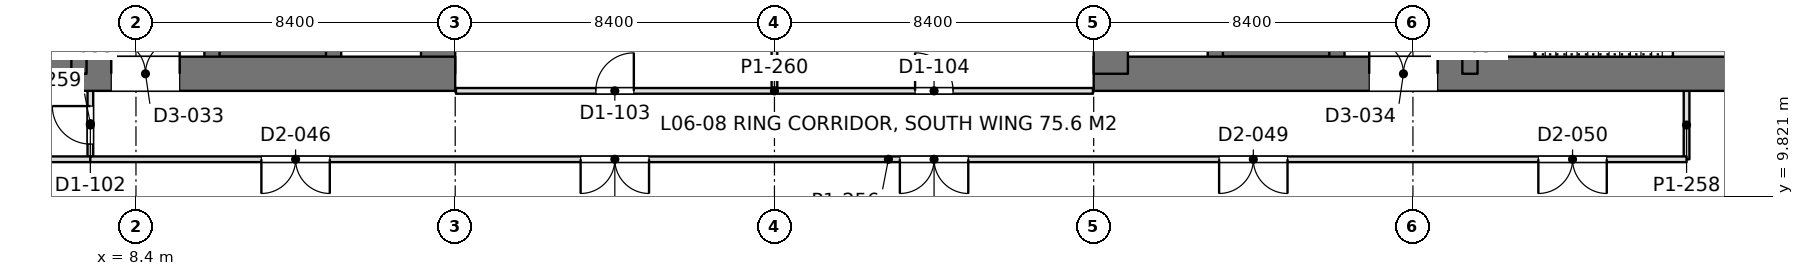
"""IFC4 building model, lengths in metres.
Left out: names, types, materials, properties, quantities, classifications, styles, units other than length and angle.
Written with IfcOpenShell. Run it as: python <this file> out.ifc"""

import sys

from ifc_helpers import new_model, si_unit, direction, frame, frame_2d, origin, place, context, subcontext, project, spatial, rectangle, extrude, element, fill, save


model = new_model("IFC4")
c1 = context("Model", 3, precision=1e-05, world=origin(), true_north=direction((0.0, 1.0)))
c2 = subcontext(c1, "Body", "Model", "MODEL_VIEW")
j1 = project(units=[si_unit("LENGTHUNIT", "METRE"), si_unit("PLANEANGLEUNIT", "RADIAN")], contexts=[c1])
p1 = place(None, origin())
s1 = spatial("IfcSite", under=j1, at=p1, CompositionType="ELEMENT")
p2 = place(p1, origin())
s2 = spatial("IfcBuilding", under=s1, at=p2, CompositionType="ELEMENT")
p3 = place(p2, frame((0.0, 0.0, 27.9)))
s3 = spatial("IfcBuildingStorey", under=s2, at=p3, CompositionType="ELEMENT", Elevation=27.9)
p4 = place(p3, frame((-1.2, 13.05, 0.0), z_axis=(0.0, 0.0, 1.0), x_axis=(1.0, 0.0, 0.0)))
e1 = element("IfcWall", 1, at=p4, inside=s3, PredefinedType="SHEAR", context=c2, shape_type="SweptSolid", body=[
    extrude(rectangle(XDim=18.0, YDim=0.9, at=frame_2d((9.0, 0.0))), origin(), (0.0, 0.0, 1.0), 4.5),
])
p5 = place(p4, frame((8.95, 0.0, 0.0)))
e2 = element("IfcOpeningElement", 2, at=p5, cuts=e1, PredefinedType="OPENING", context=c2, shape_type="SweptSolid", body=[
    extrude(rectangle(XDim=1.8, YDim=2.4, at=frame_2d((0.9, 1.2))), frame((0.0, 0.46, 0.0), z_axis=(0.0, -1.0, 0.0), x_axis=(1.0, 0.0, 0.0)), (0.0, 0.0, 1.0), 0.92),
])
p6 = place(p3, frame((16.35, 13.05, 0.0), z_axis=(0.0, 0.0, 1.0), x_axis=(0.0, 1.0, 0.0)))
e3 = element("IfcWall", 3, at=p6, inside=s3, PredefinedType="SHEAR", context=c2, shape_type="SweptSolid", body=[
    extrude(rectangle(XDim=24.3, YDim=0.9, at=frame_2d((12.15, 0.0))), origin(), (0.0, 0.0, 1.0), 4.5),
])
p7 = place(p3, frame((6.9, 13.05, 0.0), z_axis=(0.0, 0.0, 1.0), x_axis=(0.0, 1.0, 0.0)))
e4 = element("IfcWall", 4, at=p7, inside=s3, PredefinedType="SHEAR", context=c2, shape_type="SweptSolid", body=[
    extrude(rectangle(XDim=24.3, YDim=0.4, at=frame_2d((12.15, 0.0))), origin(), (0.0, 0.0, 1.0), 4.5),
])
p8 = place(p7, frame((1.3, 0.0, 0.0)))
e5 = element("IfcOpeningElement", 5, at=p8, cuts=e4, PredefinedType="OPENING", context=c2, shape_type="SweptSolid", body=[
    extrude(rectangle(XDim=1.0, YDim=2.2, at=frame_2d((0.5, 1.1))), frame((0.0, 0.21, 0.0), z_axis=(0.0, -1.0, 0.0), x_axis=(1.0, 0.0, 0.0)), (0.0, 0.0, 1.0), 0.42),
])
p9 = place(p7, frame((22.0, 0.0, 0.0)))
e6 = element("IfcOpeningElement", 6, at=p9, cuts=e4, PredefinedType="OPENING", context=c2, shape_type="SweptSolid", body=[
    extrude(rectangle(XDim=1.0, YDim=2.2, at=frame_2d((0.5, 1.1))), frame((0.0, 0.21, 0.0), z_axis=(0.0, -1.0, 0.0), x_axis=(1.0, 0.0, 0.0)), (0.0, 0.0, 1.0), 0.42),
])
p10 = place(p7, frame((5.55, 0.0, 0.0)))
e7 = element("IfcOpeningElement", 7, at=p10, cuts=e4, PredefinedType="OPENING", context=c2, shape_type="SweptSolid", body=[
    extrude(rectangle(XDim=1.0, YDim=2.2, at=frame_2d((0.5, 1.1))), frame((0.0, 0.21, 0.0), z_axis=(0.0, -1.0, 0.0), x_axis=(1.0, 0.0, 0.0)), (0.0, 0.0, 1.0), 0.42),
])
p11 = place(p7, frame((9.55, 0.0, 0.0)))
e8 = element("IfcOpeningElement", 8, at=p11, cuts=e4, PredefinedType="OPENING", context=c2, shape_type="SweptSolid", body=[
    extrude(rectangle(XDim=1.0, YDim=2.2, at=frame_2d((0.5, 1.1))), frame((0.0, 0.21, 0.0), z_axis=(0.0, -1.0, 0.0), x_axis=(1.0, 0.0, 0.0)), (0.0, 0.0, 1.0), 0.42),
])
p12 = place(p7, frame((12.8, 0.0, 0.0)))
e9 = element("IfcOpeningElement", 9, at=p12, cuts=e4, PredefinedType="OPENING", context=c2, shape_type="SweptSolid", body=[
    extrude(rectangle(XDim=1.1, YDim=2.2, at=frame_2d((0.55, 1.1))), frame((0.0, 0.21, 0.0), z_axis=(0.0, -1.0, 0.0), x_axis=(1.0, 0.0, 0.0)), (0.0, 0.0, 1.0), 0.42),
])
p13 = place(p7, frame((15.538, 0.0, 0.0)))
e10 = element("IfcOpeningElement", 10, at=p13, cuts=e4, PredefinedType="OPENING", context=c2, shape_type="SweptSolid", body=[
    extrude(rectangle(XDim=1.1, YDim=2.2, at=frame_2d((0.55, 1.1))), frame((0.0, 0.21, 0.0), z_axis=(0.0, -1.0, 0.0), x_axis=(1.0, 0.0, 0.0)), (0.0, 0.0, 1.0), 0.42),
])
p14 = place(p7, frame((18.262, 0.0, 0.0)))
e11 = element("IfcOpeningElement", 11, at=p14, cuts=e4, PredefinedType="OPENING", context=c2, shape_type="SweptSolid", body=[
    extrude(rectangle(XDim=1.1, YDim=2.2, at=frame_2d((0.55, 1.1))), frame((0.0, 0.21, 0.0), z_axis=(0.0, -1.0, 0.0), x_axis=(1.0, 0.0, 0.0)), (0.0, 0.0, 1.0), 0.42),
])
p15 = place(p3, frame((10.4, 13.05, 0.0), z_axis=(0.0, 0.0, 1.0), x_axis=(0.0, 1.0, 0.0)))
e12 = element("IfcWall", 12, at=p15, inside=s3, PredefinedType="SHEAR", context=c2, shape_type="SweptSolid", body=[
    extrude(rectangle(XDim=24.3, YDim=0.4, at=frame_2d((12.15, 0.0))), origin(), (0.0, 0.0, 1.0), 4.5),
])
p16 = place(p15, frame((1.5, 0.0, 0.0)))
e13 = element("IfcOpeningElement", 13, at=p16, cuts=e12, PredefinedType="OPENING", context=c2, shape_type="SweptSolid", body=[
    extrude(rectangle(XDim=1.1, YDim=2.2, at=frame_2d((0.55, 1.1))), frame((0.0, 0.21, 0.0), z_axis=(0.0, -1.0, 0.0), x_axis=(1.0, 0.0, 0.0)), (0.0, 0.0, 1.0), 0.42),
])
p17 = place(p15, frame((4.35, 0.0, 0.0)))
e14 = element("IfcOpeningElement", 14, at=p17, cuts=e12, PredefinedType="OPENING", context=c2, shape_type="SweptSolid", body=[
    extrude(rectangle(XDim=1.1, YDim=2.2, at=frame_2d((0.55, 1.1))), frame((0.0, 0.21, 0.0), z_axis=(0.0, -1.0, 0.0), x_axis=(1.0, 0.0, 0.0)), (0.0, 0.0, 1.0), 0.42),
])
p18 = place(p15, frame((7.2, 0.0, 0.0)))
e15 = element("IfcOpeningElement", 15, at=p18, cuts=e12, PredefinedType="OPENING", context=c2, shape_type="SweptSolid", body=[
    extrude(rectangle(XDim=1.1, YDim=2.2, at=frame_2d((0.55, 1.1))), frame((0.0, 0.21, 0.0), z_axis=(0.0, -1.0, 0.0), x_axis=(1.0, 0.0, 0.0)), (0.0, 0.0, 1.0), 0.42),
])
p19 = place(p15, frame((21.45, 0.0, 0.0)))
e16 = element("IfcOpeningElement", 16, at=p19, cuts=e12, PredefinedType="OPENING", context=c2, shape_type="SweptSolid", body=[
    extrude(rectangle(XDim=1.1, YDim=2.2, at=frame_2d((0.55, 1.1))), frame((0.0, 0.21, 0.0), z_axis=(0.0, -1.0, 0.0), x_axis=(1.0, 0.0, 0.0)), (0.0, 0.0, 1.0), 0.42),
])
p20 = place(p3, frame((13.6, 13.05, 0.0), z_axis=(0.0, 0.0, 1.0), x_axis=(0.0, 1.0, 0.0)))
e17 = element("IfcWall", 17, at=p20, inside=s3, PredefinedType="SHEAR", context=c2, shape_type="SweptSolid", body=[
    extrude(rectangle(XDim=24.3, YDim=0.4, at=frame_2d((12.15, 0.0))), origin(), (0.0, 0.0, 1.0), 4.5),
])
p21 = place(p3, frame((10.4, 13.65, 0.0), z_axis=(0.0, 0.0, 1.0), x_axis=(1.0, 0.0, 0.0)))
e18 = element("IfcWall", 18, at=p21, inside=s3, PredefinedType="SHEAR", context=c2, shape_type="SweptSolid", body=[
    extrude(rectangle(XDim=3.2, YDim=0.3, at=frame_2d((1.6, 0.0))), origin(), (0.0, 0.0, 1.0), 4.5),
])
p22 = place(p3, frame((33.6, 13.05, 0.0), z_axis=(0.0, 0.0, 1.0), x_axis=(1.0, 0.0, 0.0)))
e19 = element("IfcWall", 19, at=p22, inside=s3, PredefinedType="SHEAR", context=c2, shape_type="SweptSolid", body=[
    extrude(rectangle(XDim=18.0, YDim=0.9, at=frame_2d((9.0, 0.0))), origin(), (0.0, 0.0, 1.0), 4.5),
])
p23 = place(p22, frame((7.25, 0.0, 0.0)))
e20 = element("IfcOpeningElement", 20, at=p23, cuts=e19, PredefinedType="OPENING", context=c2, shape_type="SweptSolid", body=[
    extrude(rectangle(XDim=1.8, YDim=2.4, at=frame_2d((0.9, 1.2))), frame((0.0, 0.46, 0.0), z_axis=(0.0, -1.0, 0.0), x_axis=(1.0, 0.0, 0.0)), (0.0, 0.0, 1.0), 0.92),
])
p24 = place(p3, frame((34.05, 13.05, 0.0), z_axis=(0.0, 0.0, 1.0), x_axis=(0.0, 1.0, 0.0)))
e21 = element("IfcWall", 21, at=p24, inside=s3, PredefinedType="SHEAR", context=c2, shape_type="SweptSolid", body=[
    extrude(rectangle(XDim=24.3, YDim=0.9, at=frame_2d((12.15, 0.0))), origin(), (0.0, 0.0, 1.0), 4.5),
])
p25 = place(p3, frame((43.5, 13.05, 0.0), z_axis=(0.0, 0.0, 1.0), x_axis=(0.0, 1.0, 0.0)))
e22 = element("IfcWall", 22, at=p25, inside=s3, PredefinedType="SHEAR", context=c2, shape_type="SweptSolid", body=[
    extrude(rectangle(XDim=24.3, YDim=0.4, at=frame_2d((12.15, 0.0))), origin(), (0.0, 0.0, 1.0), 4.5),
])
p26 = place(p25, frame((1.3, 0.0, 0.0)))
e23 = element("IfcOpeningElement", 23, at=p26, cuts=e22, PredefinedType="OPENING", context=c2, shape_type="SweptSolid", body=[
    extrude(rectangle(XDim=1.0, YDim=2.2, at=frame_2d((0.5, 1.1))), frame((0.0, 0.21, 0.0), z_axis=(0.0, -1.0, 0.0), x_axis=(1.0, 0.0, 0.0)), (0.0, 0.0, 1.0), 0.42),
])
p27 = place(p25, frame((22.0, 0.0, 0.0)))
e24 = element("IfcOpeningElement", 24, at=p27, cuts=e22, PredefinedType="OPENING", context=c2, shape_type="SweptSolid", body=[
    extrude(rectangle(XDim=1.0, YDim=2.2, at=frame_2d((0.5, 1.1))), frame((0.0, 0.21, 0.0), z_axis=(0.0, -1.0, 0.0), x_axis=(1.0, 0.0, 0.0)), (0.0, 0.0, 1.0), 0.42),
])
p28 = place(p25, frame((5.55, 0.0, 0.0)))
e25 = element("IfcOpeningElement", 25, at=p28, cuts=e22, PredefinedType="OPENING", context=c2, shape_type="SweptSolid", body=[
    extrude(rectangle(XDim=1.0, YDim=2.2, at=frame_2d((0.5, 1.1))), frame((0.0, 0.21, 0.0), z_axis=(0.0, -1.0, 0.0), x_axis=(1.0, 0.0, 0.0)), (0.0, 0.0, 1.0), 0.42),
])
p29 = place(p25, frame((9.55, 0.0, 0.0)))
e26 = element("IfcOpeningElement", 26, at=p29, cuts=e22, PredefinedType="OPENING", context=c2, shape_type="SweptSolid", body=[
    extrude(rectangle(XDim=1.0, YDim=2.2, at=frame_2d((0.5, 1.1))), frame((0.0, 0.21, 0.0), z_axis=(0.0, -1.0, 0.0), x_axis=(1.0, 0.0, 0.0)), (0.0, 0.0, 1.0), 0.42),
])
p30 = place(p25, frame((12.8, 0.0, 0.0)))
e27 = element("IfcOpeningElement", 27, at=p30, cuts=e22, PredefinedType="OPENING", context=c2, shape_type="SweptSolid", body=[
    extrude(rectangle(XDim=1.1, YDim=2.2, at=frame_2d((0.55, 1.1))), frame((0.0, 0.21, 0.0), z_axis=(0.0, -1.0, 0.0), x_axis=(1.0, 0.0, 0.0)), (0.0, 0.0, 1.0), 0.42),
])
p31 = place(p25, frame((15.538, 0.0, 0.0)))
e28 = element("IfcOpeningElement", 28, at=p31, cuts=e22, PredefinedType="OPENING", context=c2, shape_type="SweptSolid", body=[
    extrude(rectangle(XDim=1.1, YDim=2.2, at=frame_2d((0.55, 1.1))), frame((0.0, 0.21, 0.0), z_axis=(0.0, -1.0, 0.0), x_axis=(1.0, 0.0, 0.0)), (0.0, 0.0, 1.0), 0.42),
])
p32 = place(p25, frame((18.262, 0.0, 0.0)))
e29 = element("IfcOpeningElement", 29, at=p32, cuts=e22, PredefinedType="OPENING", context=c2, shape_type="SweptSolid", body=[
    extrude(rectangle(XDim=1.1, YDim=2.2, at=frame_2d((0.55, 1.1))), frame((0.0, 0.21, 0.0), z_axis=(0.0, -1.0, 0.0), x_axis=(1.0, 0.0, 0.0)), (0.0, 0.0, 1.0), 0.42),
])
p33 = place(p3, frame((40.0, 13.05, 0.0), z_axis=(0.0, 0.0, 1.0), x_axis=(0.0, 1.0, 0.0)))
e30 = element("IfcWall", 30, at=p33, inside=s3, PredefinedType="SHEAR", context=c2, shape_type="SweptSolid", body=[
    extrude(rectangle(XDim=24.3, YDim=0.4, at=frame_2d((12.15, 0.0))), origin(), (0.0, 0.0, 1.0), 4.5),
])
p34 = place(p33, frame((1.5, 0.0, 0.0)))
e31 = element("IfcOpeningElement", 31, at=p34, cuts=e30, PredefinedType="OPENING", context=c2, shape_type="SweptSolid", body=[
    extrude(rectangle(XDim=1.1, YDim=2.2, at=frame_2d((0.55, 1.1))), frame((0.0, 0.21, 0.0), z_axis=(0.0, -1.0, 0.0), x_axis=(1.0, 0.0, 0.0)), (0.0, 0.0, 1.0), 0.42),
])
p35 = place(p33, frame((4.35, 0.0, 0.0)))
e32 = element("IfcOpeningElement", 32, at=p35, cuts=e30, PredefinedType="OPENING", context=c2, shape_type="SweptSolid", body=[
    extrude(rectangle(XDim=1.1, YDim=2.2, at=frame_2d((0.55, 1.1))), frame((0.0, 0.21, 0.0), z_axis=(0.0, -1.0, 0.0), x_axis=(1.0, 0.0, 0.0)), (0.0, 0.0, 1.0), 0.42),
])
p36 = place(p33, frame((7.2, 0.0, 0.0)))
e33 = element("IfcOpeningElement", 33, at=p36, cuts=e30, PredefinedType="OPENING", context=c2, shape_type="SweptSolid", body=[
    extrude(rectangle(XDim=1.1, YDim=2.2, at=frame_2d((0.55, 1.1))), frame((0.0, 0.21, 0.0), z_axis=(0.0, -1.0, 0.0), x_axis=(1.0, 0.0, 0.0)), (0.0, 0.0, 1.0), 0.42),
])
p37 = place(p33, frame((21.45, 0.0, 0.0)))
e34 = element("IfcOpeningElement", 34, at=p37, cuts=e30, PredefinedType="OPENING", context=c2, shape_type="SweptSolid", body=[
    extrude(rectangle(XDim=1.1, YDim=2.2, at=frame_2d((0.55, 1.1))), frame((0.0, 0.21, 0.0), z_axis=(0.0, -1.0, 0.0), x_axis=(1.0, 0.0, 0.0)), (0.0, 0.0, 1.0), 0.42),
])
p38 = place(p3, frame((36.8, 13.05, 0.0), z_axis=(0.0, 0.0, 1.0), x_axis=(0.0, 1.0, 0.0)))
e35 = element("IfcWall", 35, at=p38, inside=s3, PredefinedType="SHEAR", context=c2, shape_type="SweptSolid", body=[
    extrude(rectangle(XDim=24.3, YDim=0.4, at=frame_2d((12.15, 0.0))), origin(), (0.0, 0.0, 1.0), 4.5),
])
p39 = place(p3, frame((40.0, 13.65, 0.0), z_axis=(0.0, 0.0, 1.0), x_axis=(-1.0, 0.0, 0.0)))
e36 = element("IfcWall", 36, at=p39, inside=s3, PredefinedType="SHEAR", context=c2, shape_type="SweptSolid", body=[
    extrude(rectangle(XDim=3.2, YDim=0.3, at=frame_2d((1.6, 0.0))), origin(), (0.0, 0.0, 1.0), 4.5),
])
p40 = place(p3, frame((7.198, 10.8, 0.0), z_axis=(0.0, 0.0, 1.0), x_axis=(1.0, 0.0, 0.0)))
e37 = element("IfcWall", 37, at=p40, inside=s3, PredefinedType="PARTITIONING", context=c2, shape_type="SweptSolid", body=[
    extrude(rectangle(XDim=42.002, YDim=0.15, at=frame_2d((21.001, 0.0))), origin(), (0.0, 0.0, 1.0), 3.74),
])
p41 = place(p40, frame((4.502, 0.0, 0.0)))
e38 = element("IfcOpeningElement", 38, at=p41, cuts=e37, PredefinedType="OPENING", context=c2, shape_type="SweptSolid", body=[
    extrude(rectangle(XDim=1.8, YDim=2.2, at=frame_2d((0.9, 1.1))), frame((0.0, 0.085, 0.0), z_axis=(0.0, -1.0, 0.0), x_axis=(1.0, 0.0, 0.0)), (0.0, 0.0, 1.0), 0.17),
])
p42 = place(p40, frame((12.902, 0.0, 0.0)))
e39 = element("IfcOpeningElement", 39, at=p42, cuts=e37, PredefinedType="OPENING", context=c2, shape_type="SweptSolid", body=[
    extrude(rectangle(XDim=1.8, YDim=2.2, at=frame_2d((0.9, 1.1))), frame((0.0, 0.085, 0.0), z_axis=(0.0, -1.0, 0.0), x_axis=(1.0, 0.0, 0.0)), (0.0, 0.0, 1.0), 0.17),
])
p43 = place(p40, frame((21.302, 0.0, 0.0)))
e40 = element("IfcOpeningElement", 40, at=p43, cuts=e37, PredefinedType="OPENING", context=c2, shape_type="SweptSolid", body=[
    extrude(rectangle(XDim=1.8, YDim=2.2, at=frame_2d((0.9, 1.1))), frame((0.0, 0.085, 0.0), z_axis=(0.0, -1.0, 0.0), x_axis=(1.0, 0.0, 0.0)), (0.0, 0.0, 1.0), 0.17),
])
p44 = place(p40, frame((29.702, 0.0, 0.0)))
e41 = element("IfcOpeningElement", 41, at=p44, cuts=e37, PredefinedType="OPENING", context=c2, shape_type="SweptSolid", body=[
    extrude(rectangle(XDim=1.8, YDim=2.2, at=frame_2d((0.9, 1.1))), frame((0.0, 0.085, 0.0), z_axis=(0.0, -1.0, 0.0), x_axis=(1.0, 0.0, 0.0)), (0.0, 0.0, 1.0), 0.17),
])
p45 = place(p40, frame((38.102, 0.0, 0.0)))
e42 = element("IfcOpeningElement", 42, at=p45, cuts=e37, PredefinedType="OPENING", context=c2, shape_type="SweptSolid", body=[
    extrude(rectangle(XDim=1.8, YDim=2.2, at=frame_2d((0.9, 1.1))), frame((0.0, 0.085, 0.0), z_axis=(0.0, -1.0, 0.0), x_axis=(1.0, 0.0, 0.0)), (0.0, 0.0, 1.0), 0.17),
])
p46 = place(p3, frame((7.2, 10.874, 0.0), z_axis=(0.0, 0.0, 1.0), x_axis=(0.0, 1.0, 0.0)))
e43 = element("IfcWall", 43, at=p46, inside=s3, PredefinedType="PARTITIONING", context=c2, shape_type="SweptSolid", body=[
    extrude(rectangle(XDim=1.728, YDim=0.15, at=frame_2d((0.864, 0.0))), origin(), (0.0, 0.0, 1.0), 4.34),
])
p47 = place(p46, frame((0.326, 0.0, 0.0)))
e44 = element("IfcOpeningElement", 44, at=p47, cuts=e43, PredefinedType="OPENING", context=c2, shape_type="SweptSolid", body=[
    extrude(rectangle(XDim=1.0, YDim=2.2, at=frame_2d((0.5, 1.1))), frame((0.0, 0.085, 0.0), z_axis=(0.0, -1.0, 0.0), x_axis=(1.0, 0.0, 0.0)), (0.0, 0.0, 1.0), 0.17),
])
p48 = place(p3, frame((49.2, 10.8, 0.0), z_axis=(0.0, 0.0, 1.0), x_axis=(0.0, 1.0, 0.0)))
e45 = element("IfcWall", 45, at=p48, inside=s3, PredefinedType="PARTITIONING", context=c2, shape_type="SweptSolid", body=[
    extrude(rectangle(XDim=1.802, YDim=0.15, at=frame_2d((0.901, 0.0))), origin(), (0.0, 0.0, 1.0), 4.34),
])
p49 = place(p3, frame((1.2, 10.8, 0.0), z_axis=(0.0, 0.0, 1.0), x_axis=(1.0, 0.0, 0.0)))
e46 = element("IfcWall", 46, at=p49, inside=s3, PredefinedType="PARTITIONING", context=c2, shape_type="SweptSolid", body=[
    extrude(rectangle(XDim=6.002, YDim=0.15, at=frame_2d((3.001, 0.0))), origin(), (0.0, 0.0, 1.0), 4.34),
])
p50 = place(p3, frame((25.2, 12.674, 0.0), z_axis=(0.0, 0.0, 1.0), x_axis=(0.0, 1.0, 0.0)))
e47 = element("IfcWall", 47, at=p50, inside=s3, PredefinedType="PARTITIONING", context=c2, shape_type="SweptSolid", body=[
    extrude(rectangle(XDim=3.527, YDim=0.15, at=frame_2d((1.763, 0.0))), origin(), (0.0, 0.0, 1.0), 3.74),
])
p51 = place(p3, frame((16.82, 12.6, 0.0), z_axis=(0.0, 0.0, 1.0), x_axis=(1.0, 0.0, 0.0)))
e48 = element("IfcWall", 48, at=p51, inside=s3, PredefinedType="PARTITIONING", context=c2, shape_type="SweptSolid", body=[
    extrude(rectangle(XDim=16.76, YDim=0.15, at=frame_2d((8.38, 0.0))), origin(), (0.0, 0.0, 1.0), 3.74),
])
p52 = place(p51, frame((3.68, 0.0, 0.0)))
e49 = element("IfcOpeningElement", 49, at=p52, cuts=e48, PredefinedType="OPENING", context=c2, shape_type="SweptSolid", body=[
    extrude(rectangle(XDim=1.0, YDim=2.2, at=frame_2d((0.5, 1.1))), frame((0.0, 0.085, 0.0), z_axis=(0.0, -1.0, 0.0), x_axis=(1.0, 0.0, 0.0)), (0.0, 0.0, 1.0), 0.17),
])
p53 = place(p51, frame((12.08, 0.0, 0.0)))
e50 = element("IfcOpeningElement", 50, at=p53, cuts=e48, PredefinedType="OPENING", context=c2, shape_type="SweptSolid", body=[
    extrude(rectangle(XDim=1.0, YDim=2.2, at=frame_2d((0.5, 1.1))), frame((0.0, 0.085, 0.0), z_axis=(0.0, -1.0, 0.0), x_axis=(1.0, 0.0, 0.0)), (0.0, 0.0, 1.0), 0.17),
])
p54 = place(p5, origin())
e51 = element("IfcDoor", 51, at=p54, inside=s3, OperationType="DOUBLE_DOOR_SINGLE_SWING", PredefinedType="DOOR", context=c2, shape_type="SweptSolid", body=[
    extrude(rectangle(XDim=1.8, YDim=2.4, at=frame_2d((0.9, 1.2))), frame((0.0, 0.025, 0.0), z_axis=(0.0, -1.0, 0.0), x_axis=(1.0, 0.0, 0.0)), (0.0, 0.0, 1.0), 0.05),
])
fill(e2, e51)
p55 = place(p23, origin())
e52 = element("IfcDoor", 52, at=p55, inside=s3, OperationType="DOUBLE_DOOR_SINGLE_SWING", PredefinedType="DOOR", context=c2, shape_type="SweptSolid", body=[
    extrude(rectangle(XDim=1.8, YDim=2.4, at=frame_2d((0.9, 1.2))), frame((0.0, 0.025, 0.0), z_axis=(0.0, -1.0, 0.0), x_axis=(1.0, 0.0, 0.0)), (0.0, 0.0, 1.0), 0.05),
])
fill(e20, e52)
p56 = place(p41, frame((1.8, 0.0, 0.0), z_axis=(0.0, 0.0, 1.0), x_axis=(-1.0, 0.0, 0.0)))
e53 = element("IfcDoor", 53, at=p56, inside=s3, OperationType="DOUBLE_DOOR_SINGLE_SWING", PredefinedType="DOOR", context=c2, shape_type="SweptSolid", body=[
    extrude(rectangle(XDim=1.8, YDim=2.2, at=frame_2d((0.9, 1.1))), frame((0.0, 0.025, 0.0), z_axis=(0.0, -1.0, 0.0), x_axis=(1.0, 0.0, 0.0)), (0.0, 0.0, 1.0), 0.05),
])
fill(e38, e53)
p57 = place(p42, frame((1.8, 0.0, 0.0), z_axis=(0.0, 0.0, 1.0), x_axis=(-1.0, 0.0, 0.0)))
e54 = element("IfcDoor", 54, at=p57, inside=s3, OperationType="DOUBLE_DOOR_SINGLE_SWING", PredefinedType="DOOR", context=c2, shape_type="SweptSolid", body=[
    extrude(rectangle(XDim=1.8, YDim=2.2, at=frame_2d((0.9, 1.1))), frame((0.0, 0.025, 0.0), z_axis=(0.0, -1.0, 0.0), x_axis=(1.0, 0.0, 0.0)), (0.0, 0.0, 1.0), 0.05),
])
fill(e39, e54)
p58 = place(p43, frame((1.8, 0.0, 0.0), z_axis=(0.0, 0.0, 1.0), x_axis=(-1.0, 0.0, 0.0)))
e55 = element("IfcDoor", 55, at=p58, inside=s3, OperationType="DOUBLE_DOOR_SINGLE_SWING", PredefinedType="DOOR", context=c2, shape_type="SweptSolid", body=[
    extrude(rectangle(XDim=1.8, YDim=2.2, at=frame_2d((0.9, 1.1))), frame((0.0, 0.025, 0.0), z_axis=(0.0, -1.0, 0.0), x_axis=(1.0, 0.0, 0.0)), (0.0, 0.0, 1.0), 0.05),
])
fill(e40, e55)
p59 = place(p44, frame((1.8, 0.0, 0.0), z_axis=(0.0, 0.0, 1.0), x_axis=(-1.0, 0.0, 0.0)))
e56 = element("IfcDoor", 56, at=p59, inside=s3, OperationType="DOUBLE_DOOR_SINGLE_SWING", PredefinedType="DOOR", context=c2, shape_type="SweptSolid", body=[
    extrude(rectangle(XDim=1.8, YDim=2.2, at=frame_2d((0.9, 1.1))), frame((0.0, 0.025, 0.0), z_axis=(0.0, -1.0, 0.0), x_axis=(1.0, 0.0, 0.0)), (0.0, 0.0, 1.0), 0.05),
])
fill(e41, e56)
p60 = place(p45, frame((1.8, 0.0, 0.0), z_axis=(0.0, 0.0, 1.0), x_axis=(-1.0, 0.0, 0.0)))
e57 = element("IfcDoor", 57, at=p60, inside=s3, OperationType="DOUBLE_DOOR_SINGLE_SWING", PredefinedType="DOOR", context=c2, shape_type="SweptSolid", body=[
    extrude(rectangle(XDim=1.8, YDim=2.2, at=frame_2d((0.9, 1.1))), frame((0.0, 0.025, 0.0), z_axis=(0.0, -1.0, 0.0), x_axis=(1.0, 0.0, 0.0)), (0.0, 0.0, 1.0), 0.05),
])
fill(e42, e57)
p61 = place(p47, origin())
e58 = element("IfcDoor", 58, at=p61, inside=s3, OperationType="SINGLE_SWING_RIGHT", PredefinedType="DOOR", context=c2, shape_type="SweptSolid", body=[
    extrude(rectangle(XDim=1.0, YDim=2.2, at=frame_2d((0.5, 1.1))), frame((0.0, 0.025, 0.0), z_axis=(0.0, -1.0, 0.0), x_axis=(1.0, 0.0, 0.0)), (0.0, 0.0, 1.0), 0.05),
])
fill(e44, e58)
p62 = place(p52, origin())
e59 = element("IfcDoor", 59, at=p62, inside=s3, OperationType="SINGLE_SWING_RIGHT", PredefinedType="DOOR", context=c2, shape_type="SweptSolid", body=[
    extrude(rectangle(XDim=1.0, YDim=2.2, at=frame_2d((0.5, 1.1))), frame((0.0, 0.025, 0.0), z_axis=(0.0, -1.0, 0.0), x_axis=(1.0, 0.0, 0.0)), (0.0, 0.0, 1.0), 0.05),
])
fill(e49, e59)
p63 = place(p53, origin())
e60 = element("IfcDoor", 60, at=p63, inside=s3, OperationType="SINGLE_SWING_LEFT", PredefinedType="DOOR", context=c2, shape_type="SweptSolid", body=[
    extrude(rectangle(XDim=1.0, YDim=2.2, at=frame_2d((0.5, 1.1))), frame((0.0, 0.025, 0.0), z_axis=(0.0, -1.0, 0.0), x_axis=(1.0, 0.0, 0.0)), (0.0, 0.0, 1.0), 0.05),
])
fill(e50, e60)
save(model, sys.argv[1])
